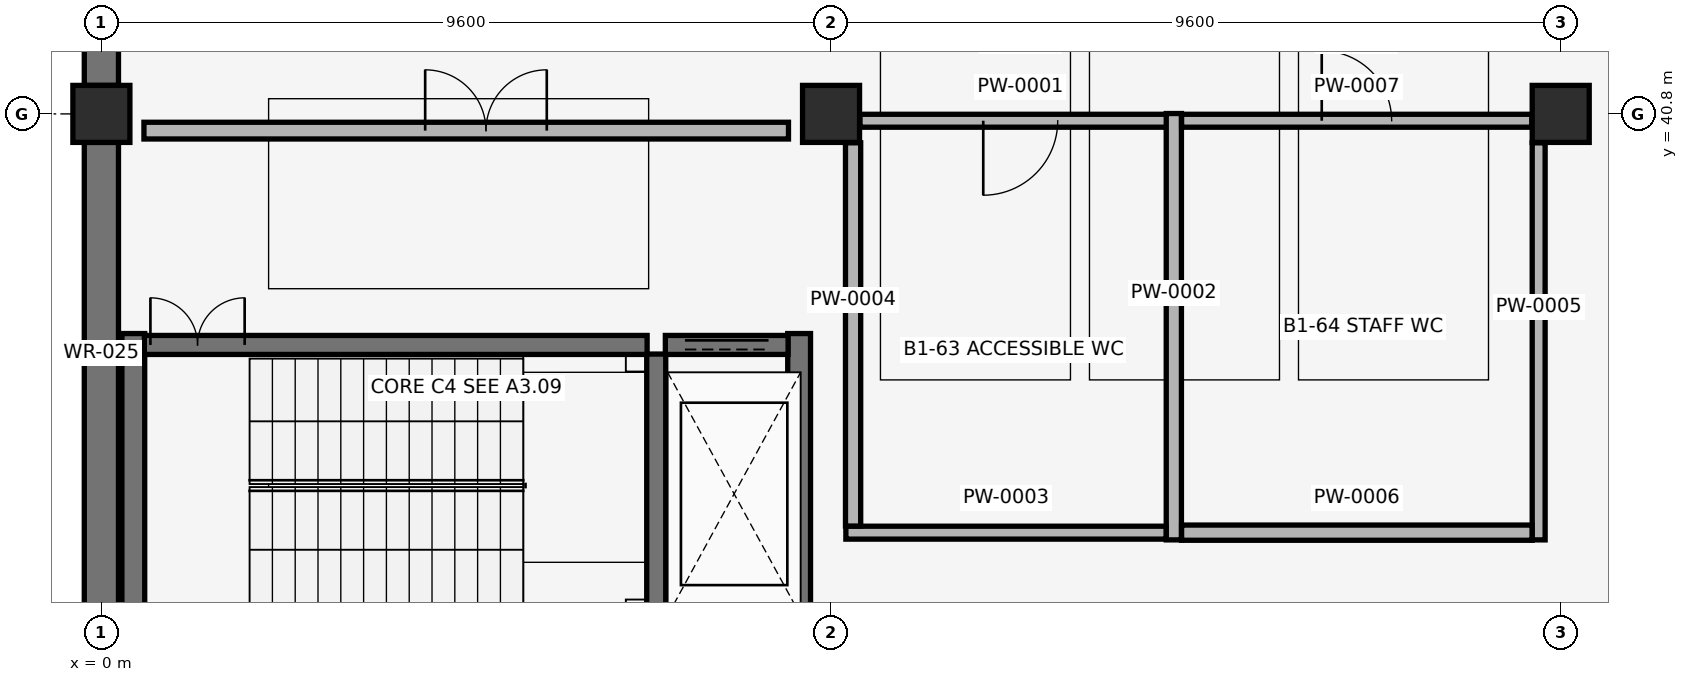
"""IFC4 building model, lengths in metres.
Left out: names, types, materials, properties, quantities, classifications, styles, units other than length and angle.
Written with IfcOpenShell. Run it as: python <this file> out.ifc"""

import sys

from ifc_helpers import new_model, si_unit, direction, frame, frame_2d, origin, origin_2d, place, context, subcontext, project, spatial, rectangle, extrude, element, fill, save


model = new_model("IFC4")
c1 = context("Model", 3, precision=1e-05, world=origin(), true_north=direction((0.0, 1.0)))
c2 = subcontext(c1, "Body", "Model", "MODEL_VIEW")
j1 = project(units=[si_unit("LENGTHUNIT", "METRE"), si_unit("PLANEANGLEUNIT", "RADIAN")], contexts=[c1])
p1 = place(None, origin())
s1 = spatial("IfcSite", under=j1, at=p1, CompositionType="ELEMENT")
p2 = place(p1, origin())
s2 = spatial("IfcBuilding", under=s1, at=p2, CompositionType="ELEMENT")
p3 = place(p2, frame((0.0, 0.0, -4.42)))
s3 = spatial("IfcBuildingStorey", under=s2, at=p3, CompositionType="ELEMENT", Elevation=-4.42)
for number, where, z_axis, x_axis in (
    (1, (0.0, 40.8, 0.0), (0.0, 0.0, 1.0), (1.0, 0.0, 0.0)),
    (2, (9.6, 40.8, 0.0), (0.0, 0.0, 1.0), (1.0, 0.0, 0.0)),
    (3, (19.2, 40.8, 0.0), (0.0, 0.0, 1.0), (1.0, 0.0, 0.0)),
):
    element("IfcColumn", number, at=place(p3, frame(where, z_axis=z_axis, x_axis=x_axis)), inside=s3, PredefinedType="COLUMN", context=c2, shape_type="SweptSolid", body=[
        extrude(rectangle(XDim=0.75, YDim=0.75, at=origin_2d()), origin(), (0.0, 0.0, 1.0), 4.42),
    ])
for number, where, z_axis, x_axis in (
    (4, (0.0, 33.975, 0.0), (0.0, 0.0, 1.0), (0.0, 1.0, 0.0)),
    (5, (0.0, 41.175, 0.0), (0.0, 0.0, 1.0), (0.0, 1.0, 0.0)),
):
    element("IfcWall", number, at=place(p3, frame(where, z_axis=z_axis, x_axis=x_axis)), inside=s3, PredefinedType="USERDEFINED", context=c2, shape_type="SweptSolid", body=[
        extrude(rectangle(XDim=6.45, YDim=0.45, at=frame_2d((3.225, 0.0))), origin(), (0.0, 0.0, 1.0), 3.27),
    ])
for number, where, z_axis, x_axis in (
    (6, (0.42, 33.81, 0.0), (0.0, 0.0, 1.0), (0.0, 1.0, 0.0)),
    (7, (9.18, 33.81, 0.0), (0.0, 0.0, 1.0), (0.0, 1.0, 0.0)),
):
    element("IfcWall", number, at=place(p3, frame(where, z_axis=z_axis, x_axis=x_axis)), inside=s3, PredefinedType="SHEAR", context=c2, shape_type="SweptSolid", body=[
        extrude(rectangle(XDim=4.1, YDim=0.3, at=frame_2d((2.05, 0.0))), origin(), (0.0, 0.0, 1.0), 4.1),
    ])
p4 = place(p3, frame((7.3, 34.11, 0.0), z_axis=(0.0, 0.0, 1.0), x_axis=(0.0, 1.0, 0.0)))
e8 = element("IfcWall", 8, at=p4, inside=s3, PredefinedType="SHEAR", context=c2, shape_type="SweptSolid", body=[
    extrude(rectangle(XDim=3.53, YDim=0.25, at=frame_2d((1.765, 0.0))), origin(), (0.0, 0.0, 1.0), 4.1),
])
p5 = place(p3, frame((0.565, 37.76, 0.0), z_axis=(0.0, 0.0, 1.0), x_axis=(1.0, 0.0, 0.0)))
e9 = element("IfcWall", 9, at=p5, inside=s3, PredefinedType="SHEAR", context=c2, shape_type="SweptSolid", body=[
    extrude(rectangle(XDim=6.615, YDim=0.25, at=frame_2d((3.308, 0.0))), origin(), (0.0, 0.0, 1.0), 4.1),
])
p6 = place(p5, frame((0.08, 0.0, 0.0)))
e10 = element("IfcOpeningElement", 10, at=p6, cuts=e9, PredefinedType="OPENING", context=c2, shape_type="SweptSolid", body=[
    extrude(rectangle(XDim=1.24, YDim=2.15, at=frame_2d((0.62, 1.075))), frame((0.0, 0.135, 0.0), z_axis=(0.0, -1.0, 0.0), x_axis=(1.0, 0.0, 0.0)), (0.0, 0.0, 1.0), 0.27),
])
p7 = place(p3, frame((0.56, 40.58, 0.0), z_axis=(0.0, 0.0, 1.0), x_axis=(1.0, 0.0, 0.0)))
e11 = element("IfcWall", 11, at=p7, inside=s3, PredefinedType="PARTITIONING", context=c2, shape_type="SweptSolid", body=[
    extrude(rectangle(XDim=8.48, YDim=0.22, at=frame_2d((4.24, 0.0))), origin(), (0.0, 0.0, 1.0), 3.45),
])
p8 = place(p7, frame((3.7, 0.0, 0.0)))
e12 = element("IfcOpeningElement", 12, at=p8, cuts=e11, PredefinedType="OPENING", context=c2, shape_type="SweptSolid", body=[
    extrude(rectangle(XDim=1.6, YDim=2.2, at=frame_2d((0.8, 1.1))), frame((0.0, 0.12, 0.0), z_axis=(0.0, -1.0, 0.0), x_axis=(1.0, 0.0, 0.0)), (0.0, 0.0, 1.0), 0.24),
])
p9 = place(p3, frame((7.42, 37.76, 0.0), z_axis=(0.0, 0.0, 1.0), x_axis=(1.0, 0.0, 0.0)))
e13 = element("IfcWall", 13, at=p9, inside=s3, PredefinedType="SHEAR", context=c2, shape_type="SweptSolid", body=[
    extrude(rectangle(XDim=1.615, YDim=0.25, at=frame_2d((0.808, 0.0))), origin(), (0.0, 0.0, 1.0), 4.1),
])
p10 = place(p9, frame((0.258, 0.0, 0.0)))
e14 = element("IfcOpeningElement", 14, at=p10, cuts=e13, PredefinedType="OPENING", context=c2, shape_type="SweptSolid", body=[
    extrude(rectangle(XDim=1.1, YDim=2.15, at=frame_2d((0.55, 1.075))), frame((0.0, 0.135, 0.0), z_axis=(0.0, -1.0, 0.0), x_axis=(1.0, 0.0, 0.0)), (0.0, 0.0, 1.0), 0.27),
])
p11 = place(p3, frame((9.98, 40.71, 0.0), z_axis=(0.0, 0.0, 1.0), x_axis=(1.0, 0.0, 0.0)))
e15 = element("IfcWall", 15, at=p11, inside=s3, PredefinedType="PLUMBINGWALL", context=c2, shape_type="SweptSolid", body=[
    extrude(rectangle(XDim=4.225, YDim=0.17, at=frame_2d((2.113, 0.0))), origin(), (0.0, 0.0, 1.0), 3.45),
])
p12 = place(p11, frame((1.623, 0.0, 0.0)))
e16 = element("IfcOpeningElement", 16, at=p12, cuts=e15, PredefinedType="OPENING", context=c2, shape_type="SweptSolid", body=[
    extrude(rectangle(XDim=0.98, YDim=2.08, at=frame_2d((0.49, 1.04))), frame((0.0, 0.095, 0.0), z_axis=(0.0, -1.0, 0.0), x_axis=(1.0, 0.0, 0.0)), (0.0, 0.0, 1.0), 0.19),
])
p13 = place(p3, frame((14.11, 35.195, 0.0), z_axis=(0.0, 0.0, 1.0), x_axis=(0.0, 1.0, 0.0)))
e17 = element("IfcWall", 17, at=p13, inside=s3, PredefinedType="PLUMBINGWALL", context=c2, shape_type="SweptSolid", body=[
    extrude(rectangle(XDim=5.61, YDim=0.2, at=frame_2d((2.805, 0.0))), origin(), (0.0, 0.0, 1.0), 3.45),
])
p14 = place(p3, frame((9.795, 35.29, 0.0), z_axis=(0.0, 0.0, 1.0), x_axis=(1.0, 0.0, 0.0)))
e18 = element("IfcWall", 18, at=p14, inside=s3, PredefinedType="PLUMBINGWALL", context=c2, shape_type="SweptSolid", body=[
    extrude(rectangle(XDim=4.213, YDim=0.17, at=frame_2d((2.106, 0.0))), origin(), (0.0, 0.0, 1.0), 3.46),
])
p15 = place(p3, frame((9.89, 35.377, 0.0), z_axis=(0.0, 0.0, 1.0), x_axis=(0.0, 1.0, 0.0)))
e19 = element("IfcWall", 19, at=p15, inside=s3, PredefinedType="PLUMBINGWALL", context=c2, shape_type="SweptSolid", body=[
    extrude(rectangle(XDim=5.043, YDim=0.2, at=frame_2d((2.521, 0.0))), origin(), (0.0, 0.0, 1.0), 3.46),
])
p16 = place(p3, frame((18.91, 35.195, 0.0), z_axis=(0.0, 0.0, 1.0), x_axis=(0.0, 1.0, 0.0)))
e20 = element("IfcWall", 20, at=p16, inside=s3, PredefinedType="PLUMBINGWALL", context=c2, shape_type="SweptSolid", body=[
    extrude(rectangle(XDim=5.225, YDim=0.17, at=frame_2d((2.612, 0.0))), origin(), (0.0, 0.0, 1.0), 3.46),
])
p17 = place(p3, frame((14.212, 35.29, 0.0), z_axis=(0.0, 0.0, 1.0), x_axis=(1.0, 0.0, 0.0)))
e21 = element("IfcWall", 21, at=p17, inside=s3, PredefinedType="PLUMBINGWALL", context=c2, shape_type="SweptSolid", body=[
    extrude(rectangle(XDim=4.611, YDim=0.2, at=frame_2d((2.306, 0.0))), origin(), (0.0, 0.0, 1.0), 3.46),
])
p18 = place(p3, frame((14.212, 40.71, 0.0), z_axis=(0.0, 0.0, 1.0), x_axis=(1.0, 0.0, 0.0)))
e22 = element("IfcWall", 22, at=p18, inside=s3, PredefinedType="PLUMBINGWALL", context=c2, shape_type="SweptSolid", body=[
    extrude(rectangle(XDim=4.608, YDim=0.17, at=frame_2d((2.304, 0.0))), origin(), (0.0, 0.0, 1.0), 3.45),
])
p19 = place(p18, frame((1.844, 0.0, 0.0)))
e23 = element("IfcOpeningElement", 23, at=p19, cuts=e22, PredefinedType="OPENING", context=c2, shape_type="SweptSolid", body=[
    extrude(rectangle(XDim=0.92, YDim=2.08, at=frame_2d((0.46, 1.04))), frame((0.0, 0.095, 0.0), z_axis=(0.0, -1.0, 0.0), x_axis=(1.0, 0.0, 0.0)), (0.0, 0.0, 1.0), 0.19),
])
p20 = place(p6, origin())
e24 = element("IfcDoor", 24, at=p20, inside=s3, OperationType="DOUBLE_DOOR_SINGLE_SWING", PredefinedType="DOOR", context=c2, shape_type="SweptSolid", body=[
    extrude(rectangle(XDim=1.24, YDim=2.15, at=frame_2d((0.62, 1.075))), frame((0.0, 0.025, 0.0), z_axis=(0.0, -1.0, 0.0), x_axis=(1.0, 0.0, 0.0)), (0.0, 0.0, 1.0), 0.05),
])
fill(e10, e24)
p21 = place(p8, origin())
e25 = element("IfcDoor", 25, at=p21, inside=s3, OperationType="DOUBLE_DOOR_SINGLE_SWING", PredefinedType="DOOR", context=c2, shape_type="SweptSolid", body=[
    extrude(rectangle(XDim=1.6, YDim=2.2, at=frame_2d((0.8, 1.1))), frame((0.0, 0.025, 0.0), z_axis=(0.0, -1.0, 0.0), x_axis=(1.0, 0.0, 0.0)), (0.0, 0.0, 1.0), 0.05),
])
fill(e12, e25)
p22 = place(p10, origin())
e26 = element("IfcDoor", 26, at=p22, inside=s3, OperationType="DOUBLE_DOOR_SLIDING", PredefinedType="DOOR", context=c2, shape_type="SweptSolid", body=[
    extrude(rectangle(XDim=1.1, YDim=2.15, at=frame_2d((0.55, 1.075))), frame((0.0, 0.025, 0.0), z_axis=(0.0, -1.0, 0.0), x_axis=(1.0, 0.0, 0.0)), (0.0, 0.0, 1.0), 0.05),
])
fill(e14, e26)
p23 = place(p12, origin())
e27 = element("IfcDoor", 27, at=p23, inside=s3, OperationType="SINGLE_SWING_RIGHT", PredefinedType="DOOR", context=c2, shape_type="SweptSolid", body=[
    extrude(rectangle(XDim=0.98, YDim=2.08, at=frame_2d((0.49, 1.04))), frame((0.0, 0.025, 0.0), z_axis=(0.0, -1.0, 0.0), x_axis=(1.0, 0.0, 0.0)), (0.0, 0.0, 1.0), 0.05),
])
fill(e16, e27)
p24 = place(p19, origin())
e28 = element("IfcDoor", 28, at=p24, inside=s3, OperationType="SINGLE_SWING_LEFT", PredefinedType="DOOR", context=c2, shape_type="SweptSolid", body=[
    extrude(rectangle(XDim=0.92, YDim=2.08, at=frame_2d((0.46, 1.04))), frame((0.0, 0.025, 0.0), z_axis=(0.0, -1.0, 0.0), x_axis=(1.0, 0.0, 0.0)), (0.0, 0.0, 1.0), 0.05),
])
fill(e23, e28)
save(model, sys.argv[1])
